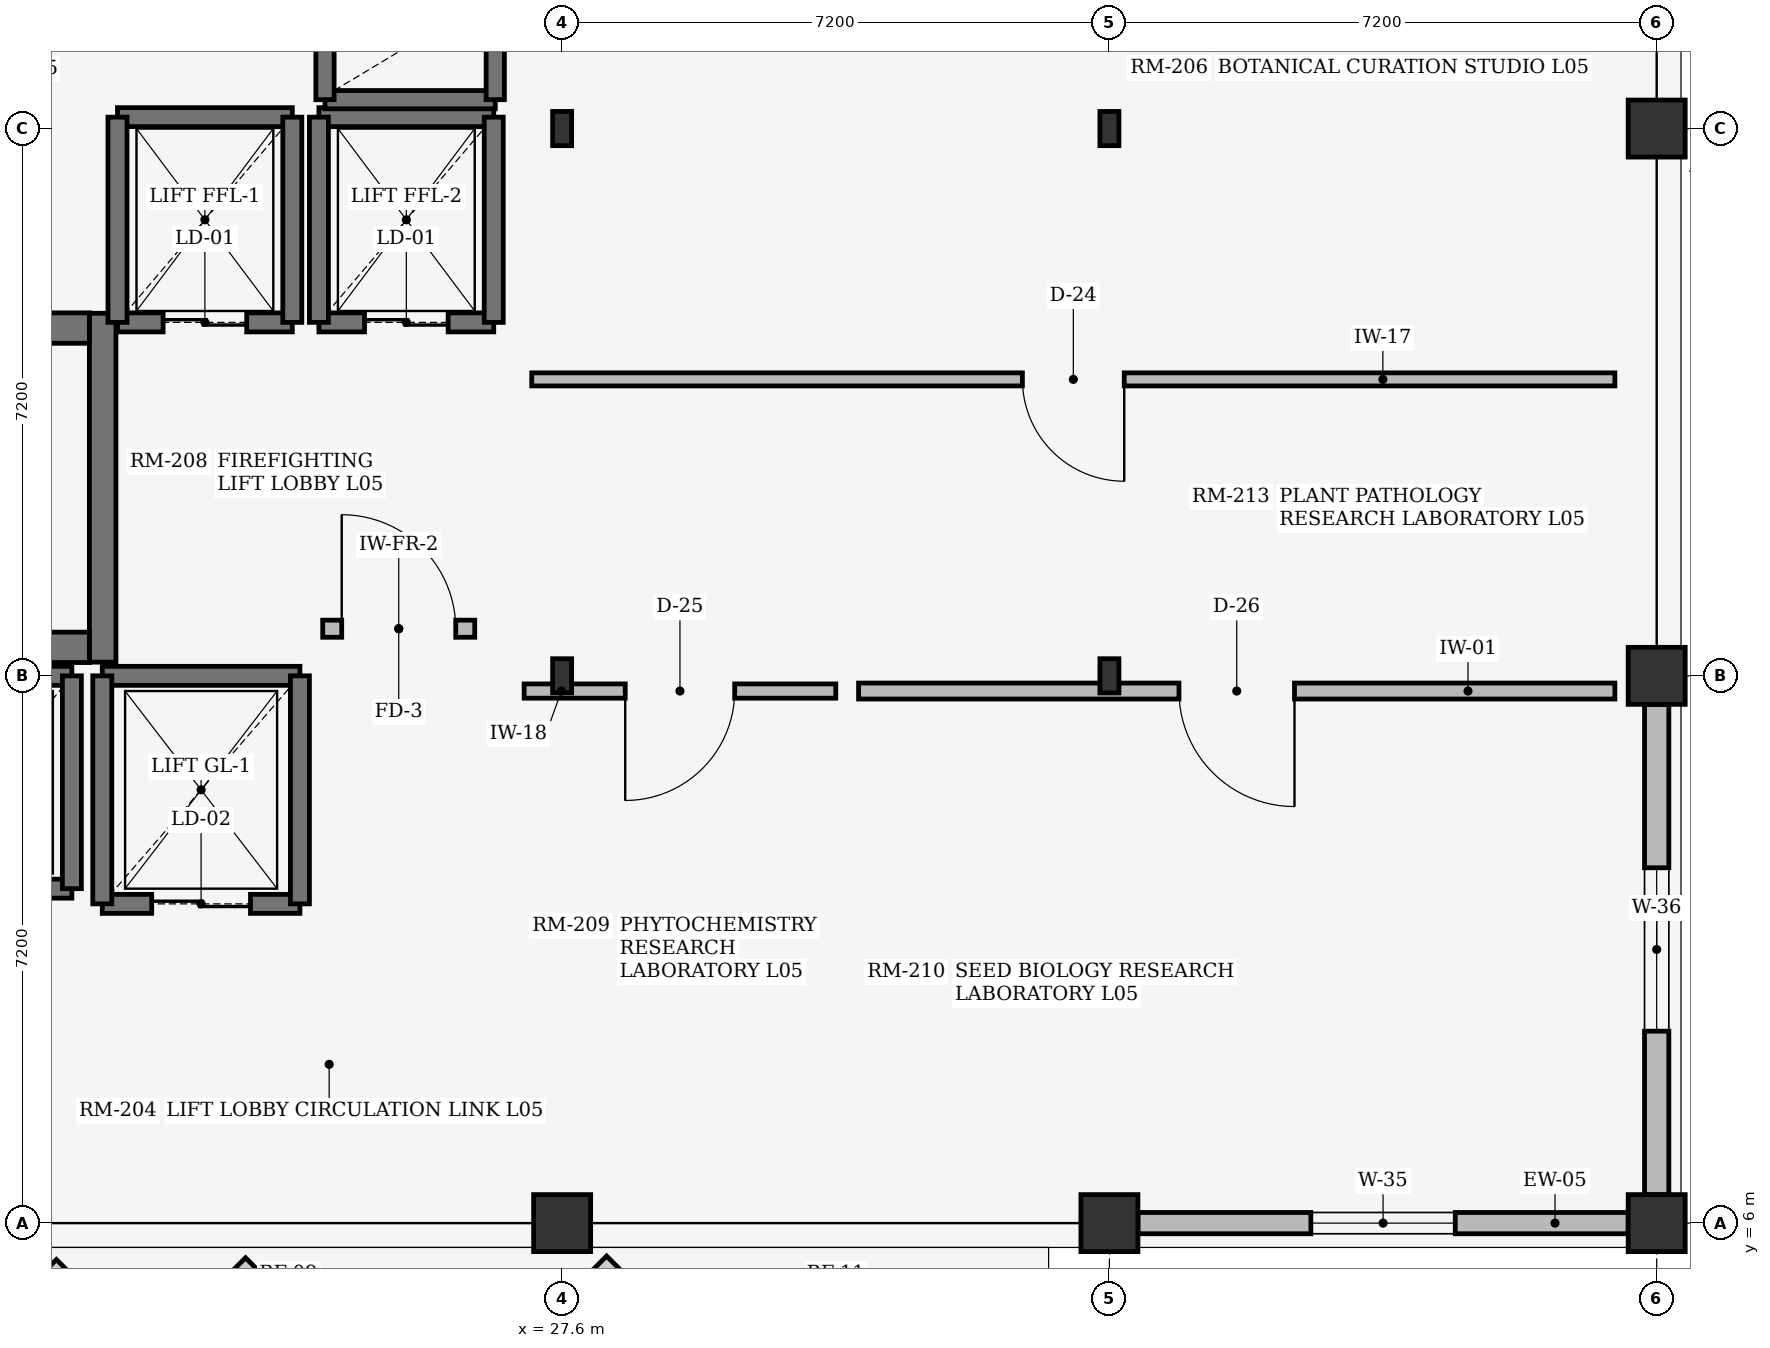
"""IFC4 building model, lengths in metres.
Left out: names, types, materials, properties, quantities, classifications, styles, units other than length and angle.
Written with IfcOpenShell. Run it as: python <this file> out.ifc"""

import sys

from ifc_helpers import new_model, si_unit, direction, frame, frame_2d, origin, origin_2d, place, context, subcontext, project, spatial, rectangle, i_section, extrude, element, fill, save


model = new_model("IFC4")
c1 = context("Model", 3, precision=1e-05, world=origin(), true_north=direction((0.0, 1.0)))
c2 = subcontext(c1, "Body", "Model", "MODEL_VIEW")
j1 = project(units=[si_unit("LENGTHUNIT", "METRE"), si_unit("PLANEANGLEUNIT", "RADIAN")], contexts=[c1])
p1 = place(None, origin())
s1 = spatial("IfcSite", under=j1, at=p1, CompositionType="ELEMENT")
p2 = place(p1, origin())
s2 = spatial("IfcBuilding", under=s1, at=p2, CompositionType="ELEMENT")
p3 = place(p2, frame((0.0, 0.0, 21.0)))
s3 = spatial("IfcBuildingStorey", under=s2, at=p3, CompositionType="ELEMENT", Elevation=21.0)
p4 = place(p3, frame((27.6, 6.0, 0.0), z_axis=(0.0, 0.0, 1.0), x_axis=(1.0, 0.0, 0.0)))
e1 = element("IfcColumn", 1, at=p4, inside=s3, PredefinedType="COLUMN", context=c2, shape_type="SweptSolid", body=[
    extrude(rectangle(XDim=0.75, YDim=0.75, at=origin_2d()), origin(), (0.0, 0.0, 1.0), 3.67),
])
for number, where, z_axis, x_axis in (
    (2, (27.6, 13.2, 0.0), (0.0, 0.0, 1.0), (1.0, 0.0, 0.0)),
    (3, (27.6, 20.4, 0.0), (0.0, 0.0, 1.0), (1.0, 0.0, 0.0)),
):
    element("IfcColumn", number, at=place(p3, frame(where, z_axis=z_axis, x_axis=x_axis)), inside=s3, PredefinedType="COLUMN", context=c2, shape_type="SweptSolid", body=[
        extrude(i_section(OverallWidth=0.25, OverallDepth=0.45, WebThickness=0.011, FlangeThickness=0.014, at=origin_2d()), origin(), (0.0, 0.0, 1.0), 3.67),
    ])
p5 = place(p3, frame((34.8, 6.0, 0.0), z_axis=(0.0, 0.0, 1.0), x_axis=(1.0, 0.0, 0.0)))
e4 = element("IfcColumn", 4, at=p5, inside=s3, PredefinedType="COLUMN", context=c2, shape_type="SweptSolid", body=[
    extrude(rectangle(XDim=0.75, YDim=0.75, at=origin_2d()), origin(), (0.0, 0.0, 1.0), 3.67),
])
for number, where, z_axis, x_axis in (
    (5, (34.8, 13.2, 0.0), (0.0, 0.0, 1.0), (1.0, 0.0, 0.0)),
    (6, (34.8, 20.4, 0.0), (0.0, 0.0, 1.0), (1.0, 0.0, 0.0)),
):
    element("IfcColumn", number, at=place(p3, frame(where, z_axis=z_axis, x_axis=x_axis)), inside=s3, PredefinedType="COLUMN", context=c2, shape_type="SweptSolid", body=[
        extrude(i_section(OverallWidth=0.25, OverallDepth=0.45, WebThickness=0.011, FlangeThickness=0.014, at=origin_2d()), origin(), (0.0, 0.0, 1.0), 3.67),
    ])
for number, where, z_axis, x_axis in (
    (7, (42.0, 6.0, 0.0), (0.0, 0.0, 1.0), (1.0, 0.0, 0.0)),
    (8, (42.0, 13.2, 0.0), (0.0, 0.0, 1.0), (1.0, 0.0, 0.0)),
    (9, (42.0, 20.4, 0.0), (0.0, 0.0, 1.0), (1.0, 0.0, 0.0)),
):
    element("IfcColumn", number, at=place(p3, frame(where, z_axis=z_axis, x_axis=x_axis)), inside=s3, PredefinedType="COLUMN", context=c2, shape_type="SweptSolid", body=[
        extrude(rectangle(XDim=0.75, YDim=0.75, at=origin_2d()), origin(), (0.0, 0.0, 1.0), 3.67),
    ])
p6 = place(p3, frame((35.175, 6.0, 0.0), z_axis=(0.0, 0.0, 1.0), x_axis=(1.0, 0.0, 0.0)))
e10 = element("IfcWall", 10, at=p6, inside=s3, PredefinedType="STANDARD", context=c2, shape_type="SweptSolid", body=[
    extrude(rectangle(XDim=6.45, YDim=0.28, at=frame_2d((3.225, 0.0))), origin(), (0.0, 0.0, 1.0), 3.05),
])
p7 = place(p6, frame((2.275, 0.0, 0.75)))
e11 = element("IfcOpeningElement", 11, at=p7, cuts=e10, PredefinedType="OPENING", context=c2, shape_type="SweptSolid", body=[
    extrude(rectangle(XDim=1.9, YDim=1.35, at=frame_2d((0.95, 0.675))), frame((0.0, 0.15, 0.0), z_axis=(0.0, -1.0, 0.0), x_axis=(1.0, 0.0, 0.0)), (0.0, 0.0, 1.0), 0.3),
])
p8 = place(p3, frame((42.0, 6.375, 0.0), z_axis=(0.0, 0.0, 1.0), x_axis=(0.0, 1.0, 0.0)))
e12 = element("IfcWall", 12, at=p8, inside=s3, PredefinedType="STANDARD", context=c2, shape_type="SweptSolid", body=[
    extrude(rectangle(XDim=6.45, YDim=0.32, at=frame_2d((3.225, 0.0))), origin(), (0.0, 0.0, 1.0), 3.05),
])
p9 = place(p8, frame((2.15, 0.0, 0.75)))
e13 = element("IfcOpeningElement", 13, at=p9, cuts=e12, PredefinedType="OPENING", context=c2, shape_type="SweptSolid", body=[
    extrude(rectangle(XDim=2.15, YDim=1.35, at=frame_2d((1.075, 0.675))), frame((0.0, 0.17, 0.0), z_axis=(0.0, -1.0, 0.0), x_axis=(1.0, 0.0, 0.0)), (0.0, 0.0, 1.0), 0.34),
])
p10 = place(p3, frame((21.555, 13.38, 0.0), z_axis=(0.0, 0.0, 1.0), x_axis=(0.0, 1.0, 0.0)))
e14 = element("IfcWall", 14, at=p10, inside=s3, PredefinedType="SHEAR", context=c2, shape_type="SweptSolid", body=[
    extrude(rectangle(XDim=4.59, YDim=0.35, at=frame_2d((2.295, 0.0))), origin(), (0.0, 0.0, 1.0), 3.67),
])
for number, where, z_axis, x_axis in (
    (15, (13.4, 13.575, 0.0), (0.0, 0.0, 1.0), (1.0, 0.0, 0.0)),
    (16, (13.4, 17.775, 0.0), (0.0, 0.0, 1.0), (1.0, 0.0, 0.0)),
):
    element("IfcWall", number, at=place(p3, frame(where, z_axis=z_axis, x_axis=x_axis)), inside=s3, PredefinedType="SHEAR", context=c2, shape_type="SweptSolid", body=[
        extrude(rectangle(XDim=7.98, YDim=0.4, at=frame_2d((3.99, 0.0))), origin(), (0.0, 0.0, 1.0), 3.67),
    ])
p11 = place(p3, frame((21.75, 17.85, 0.0), z_axis=(0.0, 0.0, 1.0), x_axis=(1.0, 0.0, 0.0)))
e17 = element("IfcWall", 17, at=p11, inside=s3, PredefinedType="SHEAR", context=c2, shape_type="SweptSolid", body=[
    extrude(rectangle(XDim=2.3, YDim=0.25, at=frame_2d((1.15, 0.0))), origin(), (0.0, 0.0, 1.0), 3.67),
])
p12 = place(p11, frame((0.6, 0.0, 0.0)))
e18 = element("IfcOpeningElement", 18, at=p12, cuts=e17, PredefinedType="OPENING", context=c2, shape_type="SweptSolid", body=[
    extrude(rectangle(XDim=1.1, YDim=2.2, at=frame_2d((0.55, 1.1))), frame((0.0, 0.135, 0.0), z_axis=(0.0, -1.0, 0.0), x_axis=(1.0, 0.0, 0.0)), (0.0, 0.0, 1.0), 0.27),
])
p13 = place(p3, frame((21.75, 20.55, 0.0), z_axis=(0.0, 0.0, 1.0), x_axis=(1.0, 0.0, 0.0)))
e19 = element("IfcWall", 19, at=p13, inside=s3, PredefinedType="SHEAR", context=c2, shape_type="SweptSolid", body=[
    extrude(rectangle(XDim=2.3, YDim=0.25, at=frame_2d((1.15, 0.0))), origin(), (0.0, 0.0, 1.0), 3.67),
])
for number, where, z_axis, x_axis in (
    (20, (21.75, 17.85, 0.0), (0.0, 0.0, 1.0), (0.0, 1.0, 0.0)),
    (21, (24.05, 17.85, 0.0), (0.0, 0.0, 1.0), (0.0, 1.0, 0.0)),
):
    element("IfcWall", number, at=place(p3, frame(where, z_axis=z_axis, x_axis=x_axis)), inside=s3, PredefinedType="SHEAR", context=c2, shape_type="SweptSolid", body=[
        extrude(rectangle(XDim=2.7, YDim=0.25, at=frame_2d((1.35, 0.0))), origin(), (0.0, 0.0, 1.0), 3.67),
    ])
p14 = place(p3, frame((24.4, 17.85, 0.0), z_axis=(0.0, 0.0, 1.0), x_axis=(1.0, 0.0, 0.0)))
e22 = element("IfcWall", 22, at=p14, inside=s3, PredefinedType="SHEAR", context=c2, shape_type="SweptSolid", body=[
    extrude(rectangle(XDim=2.3, YDim=0.25, at=frame_2d((1.15, 0.0))), origin(), (0.0, 0.0, 1.0), 3.67),
])
p15 = place(p14, frame((0.6, 0.0, 0.0)))
e23 = element("IfcOpeningElement", 23, at=p15, cuts=e22, PredefinedType="OPENING", context=c2, shape_type="SweptSolid", body=[
    extrude(rectangle(XDim=1.1, YDim=2.2, at=frame_2d((0.55, 1.1))), frame((0.0, 0.135, 0.0), z_axis=(0.0, -1.0, 0.0), x_axis=(1.0, 0.0, 0.0)), (0.0, 0.0, 1.0), 0.27),
])
p16 = place(p3, frame((24.4, 20.55, 0.0), z_axis=(0.0, 0.0, 1.0), x_axis=(1.0, 0.0, 0.0)))
e24 = element("IfcWall", 24, at=p16, inside=s3, PredefinedType="SHEAR", context=c2, shape_type="SweptSolid", body=[
    extrude(rectangle(XDim=2.3, YDim=0.25, at=frame_2d((1.15, 0.0))), origin(), (0.0, 0.0, 1.0), 3.67),
])
for number, where, z_axis, x_axis in (
    (25, (24.4, 17.85, 0.0), (0.0, 0.0, 1.0), (0.0, 1.0, 0.0)),
    (26, (26.7, 17.85, 0.0), (0.0, 0.0, 1.0), (0.0, 1.0, 0.0)),
):
    element("IfcWall", number, at=place(p3, frame(where, z_axis=z_axis, x_axis=x_axis)), inside=s3, PredefinedType="SHEAR", context=c2, shape_type="SweptSolid", body=[
        extrude(rectangle(XDim=2.7, YDim=0.25, at=frame_2d((1.35, 0.0))), origin(), (0.0, 0.0, 1.0), 3.67),
    ])
p17 = place(p3, frame((18.85, 10.4, 0.0), z_axis=(0.0, 0.0, 1.0), x_axis=(1.0, 0.0, 0.0)))
e27 = element("IfcWall", 27, at=p17, inside=s3, PredefinedType="SHEAR", context=c2, shape_type="SweptSolid", body=[
    extrude(rectangle(XDim=2.3, YDim=0.25, at=frame_2d((1.15, 0.0))), origin(), (0.0, 0.0, 1.0), 3.67),
])
p18 = place(p17, frame((0.6, 0.0, 0.0)))
e28 = element("IfcOpeningElement", 28, at=p18, cuts=e27, PredefinedType="OPENING", context=c2, shape_type="SweptSolid", body=[
    extrude(rectangle(XDim=1.1, YDim=2.2, at=frame_2d((0.55, 1.1))), frame((0.0, 0.135, 0.0), z_axis=(0.0, -1.0, 0.0), x_axis=(1.0, 0.0, 0.0)), (0.0, 0.0, 1.0), 0.27),
])
p19 = place(p3, frame((18.85, 13.2, 0.0), z_axis=(0.0, 0.0, 1.0), x_axis=(1.0, 0.0, 0.0)))
e29 = element("IfcWall", 29, at=p19, inside=s3, PredefinedType="SHEAR", context=c2, shape_type="SweptSolid", body=[
    extrude(rectangle(XDim=2.3, YDim=0.25, at=frame_2d((1.15, 0.0))), origin(), (0.0, 0.0, 1.0), 3.67),
])
p20 = place(p3, frame((21.15, 10.4, 0.0), z_axis=(0.0, 0.0, 1.0), x_axis=(0.0, 1.0, 0.0)))
e30 = element("IfcWall", 30, at=p20, inside=s3, PredefinedType="SHEAR", context=c2, shape_type="SweptSolid", body=[
    extrude(rectangle(XDim=2.8, YDim=0.25, at=frame_2d((1.4, 0.0))), origin(), (0.0, 0.0, 1.0), 3.67),
])
p21 = place(p3, frame((21.55, 10.2, 0.0), z_axis=(0.0, 0.0, 1.0), x_axis=(1.0, 0.0, 0.0)))
e31 = element("IfcWall", 31, at=p21, inside=s3, PredefinedType="SHEAR", context=c2, shape_type="SweptSolid", body=[
    extrude(rectangle(XDim=2.6, YDim=0.25, at=frame_2d((1.3, 0.0))), origin(), (0.0, 0.0, 1.0), 3.67),
])
p22 = place(p21, frame((0.65, 0.0, 0.0)))
e32 = element("IfcOpeningElement", 32, at=p22, cuts=e31, PredefinedType="OPENING", context=c2, shape_type="SweptSolid", body=[
    extrude(rectangle(XDim=1.3, YDim=2.25, at=frame_2d((0.65, 1.125))), frame((0.0, 0.135, 0.0), z_axis=(0.0, -1.0, 0.0), x_axis=(1.0, 0.0, 0.0)), (0.0, 0.0, 1.0), 0.27),
])
p23 = place(p3, frame((21.55, 13.2, 0.0), z_axis=(0.0, 0.0, 1.0), x_axis=(1.0, 0.0, 0.0)))
e33 = element("IfcWall", 33, at=p23, inside=s3, PredefinedType="SHEAR", context=c2, shape_type="SweptSolid", body=[
    extrude(rectangle(XDim=2.6, YDim=0.25, at=frame_2d((1.3, 0.0))), origin(), (0.0, 0.0, 1.0), 3.67),
])
for number, where, z_axis, x_axis in (
    (34, (21.55, 10.2, 0.0), (0.0, 0.0, 1.0), (0.0, 1.0, 0.0)),
    (35, (24.15, 10.2, 0.0), (0.0, 0.0, 1.0), (0.0, 1.0, 0.0)),
):
    element("IfcWall", number, at=place(p3, frame(where, z_axis=z_axis, x_axis=x_axis)), inside=s3, PredefinedType="SHEAR", context=c2, shape_type="SweptSolid", body=[
        extrude(rectangle(XDim=3.0, YDim=0.25, at=frame_2d((1.5, 0.0))), origin(), (0.0, 0.0, 1.0), 3.67),
    ])
p24 = place(p3, frame((24.48, 20.78, 0.0), z_axis=(0.0, 0.0, 1.0), x_axis=(1.0, 0.0, 0.0)))
e36 = element("IfcWall", 36, at=p24, inside=s3, PredefinedType="SHEAR", context=c2, shape_type="SweptSolid", body=[
    extrude(rectangle(XDim=2.24, YDim=0.24, at=frame_2d((1.12, 0.0))), origin(), (0.0, 0.0, 1.0), 3.67),
])
for number, where, z_axis, x_axis in (
    (37, (24.48, 20.78, 0.0), (0.0, 0.0, 1.0), (0.0, 1.0, 0.0)),
    (38, (26.72, 20.78, 0.0), (0.0, 0.0, 1.0), (0.0, 1.0, 0.0)),
):
    element("IfcWall", number, at=place(p3, frame(where, z_axis=z_axis, x_axis=x_axis)), inside=s3, PredefinedType="SHEAR", context=c2, shape_type="SweptSolid", body=[
        extrude(rectangle(XDim=2.94, YDim=0.24, at=frame_2d((1.47, 0.0))), origin(), (0.0, 0.0, 1.0), 3.67),
    ])
p25 = place(p3, frame((24.45, 13.82, 0.0), z_axis=(0.0, 0.0, 1.0), x_axis=(1.0, 0.0, 0.0)))
e39 = element("IfcWall", 39, at=p25, inside=s3, PredefinedType="SOLIDWALL", context=c2, shape_type="SweptSolid", body=[
    extrude(rectangle(XDim=2.0, YDim=0.225, at=frame_2d((1.0, 0.0))), origin(), (0.0, 0.0, 1.0), 3.65),
])
p26 = place(p25, frame((0.25, 0.0, 0.0)))
e40 = element("IfcOpeningElement", 40, at=p26, cuts=e39, PredefinedType="OPENING", context=c2, shape_type="SweptSolid", body=[
    extrude(rectangle(XDim=1.5, YDim=2.2, at=frame_2d((0.75, 1.1))), frame((0.0, 0.123, 0.0), z_axis=(0.0, -1.0, 0.0), x_axis=(1.0, 0.0, 0.0)), (0.0, 0.0, 1.0), 0.245),
])
p27 = place(p3, frame((27.2, 17.1, 0.0), z_axis=(0.0, 0.0, 1.0), x_axis=(1.0, 0.0, 0.0)))
e41 = element("IfcWall", 41, at=p27, inside=s3, PredefinedType="PARTITIONING", context=c2, shape_type="SweptSolid", body=[
    extrude(rectangle(XDim=14.25, YDim=0.172, at=frame_2d((7.125, 0.0))), origin(), (0.0, 0.0, 1.0), 3.65),
])
p28 = place(p27, frame((6.455, 0.0, 0.0)))
e42 = element("IfcOpeningElement", 42, at=p28, cuts=e41, PredefinedType="OPENING", context=c2, shape_type="SweptSolid", body=[
    extrude(rectangle(XDim=1.34, YDim=2.22, at=frame_2d((0.67, 1.11))), frame((0.0, 0.096, 0.0), z_axis=(0.0, -1.0, 0.0), x_axis=(1.0, 0.0, 0.0)), (0.0, 0.0, 1.0), 0.192),
])
p29 = place(p3, frame((27.1, 13.0, 0.0), z_axis=(0.0, 0.0, 1.0), x_axis=(1.0, 0.0, 0.0)))
e43 = element("IfcWall", 43, at=p29, inside=s3, PredefinedType="PARTITIONING", context=c2, shape_type="SweptSolid", body=[
    extrude(rectangle(XDim=4.1, YDim=0.188, at=frame_2d((2.05, 0.0))), origin(), (0.0, 0.0, 1.0), 3.65),
])
p30 = place(p29, frame((1.33, 0.0, 0.0)))
e44 = element("IfcOpeningElement", 44, at=p30, cuts=e43, PredefinedType="OPENING", context=c2, shape_type="SweptSolid", body=[
    extrude(rectangle(XDim=1.44, YDim=2.24, at=frame_2d((0.72, 1.12))), frame((0.0, 0.104, 0.0), z_axis=(0.0, -1.0, 0.0), x_axis=(1.0, 0.0, 0.0)), (0.0, 0.0, 1.0), 0.208),
])
p31 = place(p3, frame((31.5, 13.0, 0.0), z_axis=(0.0, 0.0, 1.0), x_axis=(1.0, 0.0, 0.0)))
e45 = element("IfcWall", 45, at=p31, inside=s3, PredefinedType="PARTITIONING", context=c2, shape_type="SweptSolid", body=[
    extrude(rectangle(XDim=9.95, YDim=0.21, at=frame_2d((4.975, 0.0))), origin(), (0.0, 0.0, 1.0), 3.06),
])
p32 = place(p31, frame((4.215, 0.0, 0.0)))
e46 = element("IfcOpeningElement", 46, at=p32, cuts=e45, PredefinedType="OPENING", context=c2, shape_type="SweptSolid", body=[
    extrude(rectangle(XDim=1.52, YDim=2.26, at=frame_2d((0.76, 1.13))), frame((0.0, 0.115, 0.0), z_axis=(0.0, -1.0, 0.0), x_axis=(1.0, 0.0, 0.0)), (0.0, 0.0, 1.0), 0.23),
])
p33 = place(p7, origin())
e47 = element("IfcWindow", 47, at=p33, inside=s3, PartitioningType="SINGLE_PANEL", PredefinedType="WINDOW", context=c2, shape_type="SweptSolid", body=[
    extrude(rectangle(XDim=1.9, YDim=1.35, at=frame_2d((0.95, 0.675))), frame((0.0, 0.03, 0.0), z_axis=(0.0, -1.0, 0.0), x_axis=(1.0, 0.0, 0.0)), (0.0, 0.0, 1.0), 0.06),
])
fill(e11, e47)
p34 = place(p9, origin())
e48 = element("IfcWindow", 48, at=p34, inside=s3, PartitioningType="SINGLE_PANEL", PredefinedType="WINDOW", context=c2, shape_type="SweptSolid", body=[
    extrude(rectangle(XDim=2.15, YDim=1.35, at=frame_2d((1.075, 0.675))), frame((0.0, 0.03, 0.0), z_axis=(0.0, -1.0, 0.0), x_axis=(1.0, 0.0, 0.0)), (0.0, 0.0, 1.0), 0.06),
])
fill(e13, e48)
p35 = place(p12, origin())
e49 = element("IfcDoor", 49, at=p35, inside=s3, OperationType="DOUBLE_DOOR_SLIDING", PredefinedType="DOOR", context=c2, shape_type="SweptSolid", body=[
    extrude(rectangle(XDim=1.1, YDim=2.2, at=frame_2d((0.55, 1.1))), frame((0.0, 0.025, 0.0), z_axis=(0.0, -1.0, 0.0), x_axis=(1.0, 0.0, 0.0)), (0.0, 0.0, 1.0), 0.05),
])
fill(e18, e49)
p36 = place(p15, origin())
e50 = element("IfcDoor", 50, at=p36, inside=s3, OperationType="DOUBLE_DOOR_SLIDING", PredefinedType="DOOR", context=c2, shape_type="SweptSolid", body=[
    extrude(rectangle(XDim=1.1, YDim=2.2, at=frame_2d((0.55, 1.1))), frame((0.0, 0.025, 0.0), z_axis=(0.0, -1.0, 0.0), x_axis=(1.0, 0.0, 0.0)), (0.0, 0.0, 1.0), 0.05),
])
fill(e23, e50)
p37 = place(p22, origin())
e51 = element("IfcDoor", 51, at=p37, inside=s3, OperationType="DOUBLE_DOOR_SLIDING", PredefinedType="DOOR", context=c2, shape_type="SweptSolid", body=[
    extrude(rectangle(XDim=1.3, YDim=2.25, at=frame_2d((0.65, 1.125))), frame((0.0, 0.025, 0.0), z_axis=(0.0, -1.0, 0.0), x_axis=(1.0, 0.0, 0.0)), (0.0, 0.0, 1.0), 0.05),
])
fill(e32, e51)
p38 = place(p26, origin())
e52 = element("IfcDoor", 52, at=p38, inside=s3, OperationType="SINGLE_SWING_LEFT", PredefinedType="DOOR", context=c2, shape_type="SweptSolid", body=[
    extrude(rectangle(XDim=1.5, YDim=2.2, at=frame_2d((0.75, 1.1))), frame((0.0, 0.025, 0.0), z_axis=(0.0, -1.0, 0.0), x_axis=(1.0, 0.0, 0.0)), (0.0, 0.0, 1.0), 0.05),
])
fill(e40, e52)
p39 = place(p28, origin())
e53 = element("IfcDoor", 53, at=p39, inside=s3, OperationType="SINGLE_SWING_RIGHT", PredefinedType="DOOR", context=c2, shape_type="SweptSolid", body=[
    extrude(rectangle(XDim=1.34, YDim=2.22, at=frame_2d((0.67, 1.11))), frame((0.0, 0.025, 0.0), z_axis=(0.0, -1.0, 0.0), x_axis=(1.0, 0.0, 0.0)), (0.0, 0.0, 1.0), 0.05),
])
fill(e42, e53)
p40 = place(p30, frame((1.44, 0.0, 0.0), z_axis=(0.0, 0.0, 1.0), x_axis=(-1.0, 0.0, 0.0)))
e54 = element("IfcDoor", 54, at=p40, inside=s3, OperationType="SINGLE_SWING_LEFT", PredefinedType="DOOR", context=c2, shape_type="SweptSolid", body=[
    extrude(rectangle(XDim=1.44, YDim=2.24, at=frame_2d((0.72, 1.12))), frame((0.0, 0.025, 0.0), z_axis=(0.0, -1.0, 0.0), x_axis=(1.0, 0.0, 0.0)), (0.0, 0.0, 1.0), 0.05),
])
fill(e44, e54)
p41 = place(p32, origin())
e55 = element("IfcDoor", 55, at=p41, inside=s3, OperationType="SINGLE_SWING_RIGHT", PredefinedType="DOOR", context=c2, shape_type="SweptSolid", body=[
    extrude(rectangle(XDim=1.52, YDim=2.26, at=frame_2d((0.76, 1.13))), frame((0.0, 0.025, 0.0), z_axis=(0.0, -1.0, 0.0), x_axis=(1.0, 0.0, 0.0)), (0.0, 0.0, 1.0), 0.05),
])
fill(e46, e55)
save(model, sys.argv[1])
